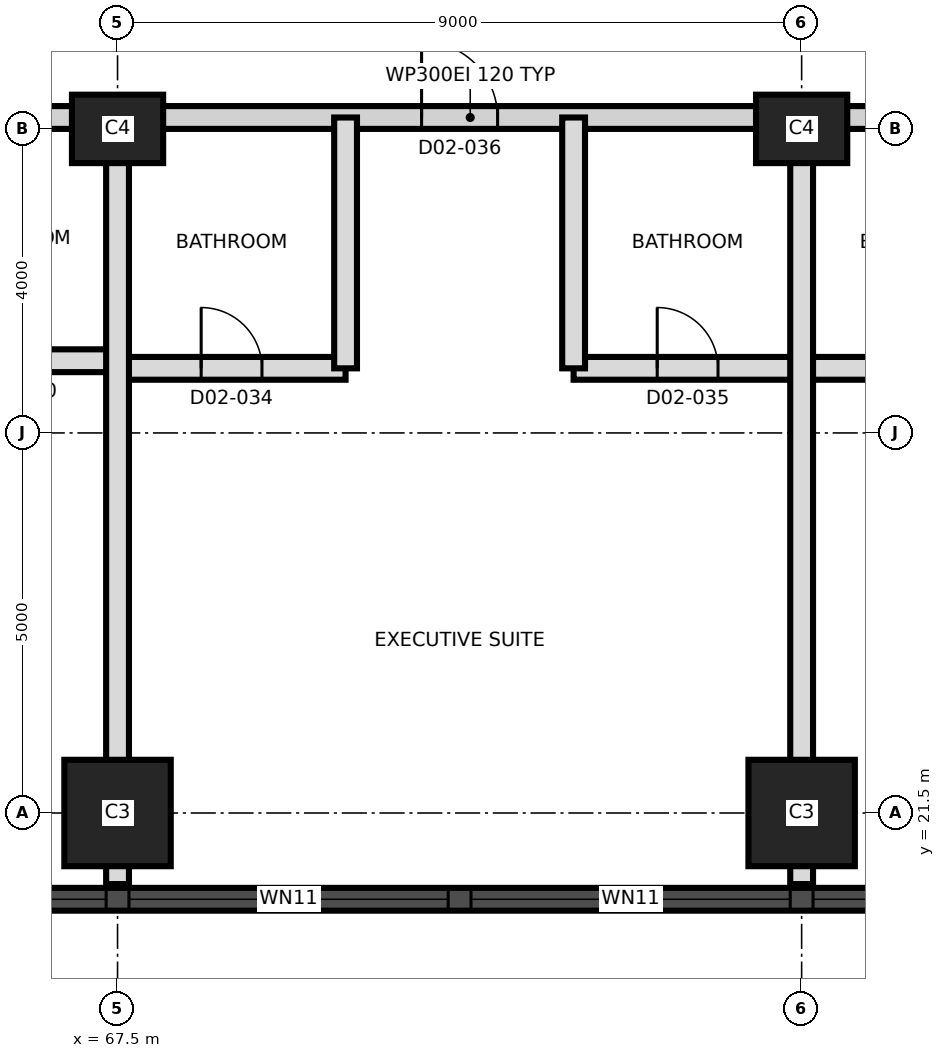
"""IFC4 building model, lengths in metres.
Left out: names, types, materials, properties, quantities, classifications, styles, units other than length and angle.
Written with IfcOpenShell. Run it as: python <this file> out.ifc"""

import sys

from ifc_helpers import new_model, si_unit, direction, frame, frame_2d, origin, origin_2d, place, context, subcontext, project, spatial, rectangle, extrude, element, fill, save


model = new_model("IFC4")
c1 = context("Model", 3, precision=1e-05, world=origin(), true_north=direction((0.0, 1.0)))
c2 = subcontext(c1, "Body", "Model", "MODEL_VIEW")
j1 = project(units=[si_unit("LENGTHUNIT", "METRE"), si_unit("PLANEANGLEUNIT", "RADIAN")], contexts=[c1])
p1 = place(None, origin())
s1 = spatial("IfcSite", under=j1, at=p1, CompositionType="ELEMENT")
p2 = place(p1, origin())
s2 = spatial("IfcBuilding", under=s1, at=p2, CompositionType="ELEMENT")
p3 = place(p2, frame((0.0, 0.0, 44.6)))
s3 = spatial("IfcBuildingStorey", under=s2, at=p3, CompositionType="ELEMENT", Elevation=44.6)
for number, where, z_axis, x_axis in (
    (1, (67.5, 21.5, 0.0), (0.0, 0.0, 1.0), (1.0, 0.0, 0.0)),
    (2, (76.5, 21.5, 0.0), (0.0, 0.0, 1.0), (1.0, 0.0, 0.0)),
):
    element("IfcColumn", number, at=place(p3, frame(where, z_axis=z_axis, x_axis=x_axis)), inside=s3, PredefinedType="COLUMN", context=c2, shape_type="SweptSolid", body=[
        extrude(rectangle(XDim=1.4, YDim=1.4, at=origin_2d()), origin(), (0.0, 0.0, 1.0), 3.7),
    ])
for number, where, z_axis, x_axis in (
    (3, (67.5, 30.5, 0.0), (0.0, 0.0, 1.0), (1.0, 0.0, 0.0)),
    (4, (76.5, 30.5, 0.0), (0.0, 0.0, 1.0), (1.0, 0.0, 0.0)),
):
    element("IfcColumn", number, at=place(p3, frame(where, z_axis=z_axis, x_axis=x_axis)), inside=s3, PredefinedType="COLUMN", context=c2, shape_type="SweptSolid", body=[
        extrude(rectangle(XDim=1.2, YDim=0.9, at=origin_2d()), origin(), (0.0, 0.0, 1.0), 3.7),
    ])
p4 = place(p3, frame((44.021, 20.365, 0.0), z_axis=(0.0, 0.0, 1.0), x_axis=(1.0, 0.0, 0.0)))
e5 = element("IfcWall", 5, at=p4, inside=s3, PredefinedType="SOLIDWALL", context=c2, shape_type="SweptSolid", body=[
    extrude(rectangle(XDim=43.466, YDim=0.3, at=frame_2d((21.733, 0.0))), origin(), (0.0, 0.0, 1.0), 3.4),
])
p5 = place(p4, frame((1.84, 0.0, 0.3)))
e6 = element("IfcOpeningElement", 6, at=p5, cuts=e5, PredefinedType="OPENING", context=c2, shape_type="SweptSolid", body=[
    extrude(rectangle(XDim=1.8, YDim=2.4, at=frame_2d((0.9, 1.2))), frame((0.0, 0.16, 0.0), z_axis=(0.0, -1.0, 0.0), x_axis=(1.0, 0.0, 0.0)), (0.0, 0.0, 1.0), 0.32),
])
p6 = place(p4, frame((5.63, 0.0, 0.9)))
e7 = element("IfcOpeningElement", 7, at=p6, cuts=e5, PredefinedType="OPENING", context=c2, shape_type="SweptSolid", body=[
    extrude(rectangle(XDim=4.2, YDim=1.5, at=frame_2d((2.1, 0.75))), frame((0.0, 0.16, 0.0), z_axis=(0.0, -1.0, 0.0), x_axis=(1.0, 0.0, 0.0)), (0.0, 0.0, 1.0), 0.32),
])
p7 = place(p4, frame((10.13, 0.0, 0.9)))
e8 = element("IfcOpeningElement", 8, at=p7, cuts=e5, PredefinedType="OPENING", context=c2, shape_type="SweptSolid", body=[
    extrude(rectangle(XDim=4.2, YDim=1.5, at=frame_2d((2.1, 0.75))), frame((0.0, 0.16, 0.0), z_axis=(0.0, -1.0, 0.0), x_axis=(1.0, 0.0, 0.0)), (0.0, 0.0, 1.0), 0.32),
])
p8 = place(p4, frame((14.63, 0.0, 0.9)))
e9 = element("IfcOpeningElement", 9, at=p8, cuts=e5, PredefinedType="OPENING", context=c2, shape_type="SweptSolid", body=[
    extrude(rectangle(XDim=4.2, YDim=1.5, at=frame_2d((2.1, 0.75))), frame((0.0, 0.16, 0.0), z_axis=(0.0, -1.0, 0.0), x_axis=(1.0, 0.0, 0.0)), (0.0, 0.0, 1.0), 0.32),
])
p9 = place(p4, frame((19.13, 0.0, 0.9)))
e10 = element("IfcOpeningElement", 10, at=p9, cuts=e5, PredefinedType="OPENING", context=c2, shape_type="SweptSolid", body=[
    extrude(rectangle(XDim=4.2, YDim=1.5, at=frame_2d((2.1, 0.75))), frame((0.0, 0.16, 0.0), z_axis=(0.0, -1.0, 0.0), x_axis=(1.0, 0.0, 0.0)), (0.0, 0.0, 1.0), 0.32),
])
p10 = place(p4, frame((23.63, 0.0, 0.9)))
e11 = element("IfcOpeningElement", 11, at=p10, cuts=e5, PredefinedType="OPENING", context=c2, shape_type="SweptSolid", body=[
    extrude(rectangle(XDim=4.2, YDim=1.5, at=frame_2d((2.1, 0.75))), frame((0.0, 0.16, 0.0), z_axis=(0.0, -1.0, 0.0), x_axis=(1.0, 0.0, 0.0)), (0.0, 0.0, 1.0), 0.32),
])
p11 = place(p4, frame((28.13, 0.0, 0.9)))
e12 = element("IfcOpeningElement", 12, at=p11, cuts=e5, PredefinedType="OPENING", context=c2, shape_type="SweptSolid", body=[
    extrude(rectangle(XDim=4.2, YDim=1.5, at=frame_2d((2.1, 0.75))), frame((0.0, 0.16, 0.0), z_axis=(0.0, -1.0, 0.0), x_axis=(1.0, 0.0, 0.0)), (0.0, 0.0, 1.0), 0.32),
])
p12 = place(p4, frame((32.63, 0.0, 0.9)))
e13 = element("IfcOpeningElement", 13, at=p12, cuts=e5, PredefinedType="OPENING", context=c2, shape_type="SweptSolid", body=[
    extrude(rectangle(XDim=4.2, YDim=1.5, at=frame_2d((2.1, 0.75))), frame((0.0, 0.16, 0.0), z_axis=(0.0, -1.0, 0.0), x_axis=(1.0, 0.0, 0.0)), (0.0, 0.0, 1.0), 0.32),
])
p13 = place(p4, frame((37.13, 0.0, 0.9)))
e14 = element("IfcOpeningElement", 14, at=p13, cuts=e5, PredefinedType="OPENING", context=c2, shape_type="SweptSolid", body=[
    extrude(rectangle(XDim=4.2, YDim=1.5, at=frame_2d((2.1, 0.75))), frame((0.0, 0.16, 0.0), z_axis=(0.0, -1.0, 0.0), x_axis=(1.0, 0.0, 0.0)), (0.0, 0.0, 1.0), 0.32),
])
p14 = place(p3, frame((67.5, 27.35, 0.0), z_axis=(0.0, 0.0, 1.0), x_axis=(1.0, 0.0, 0.0)))
e15 = element("IfcWall", 15, at=p14, inside=s3, PredefinedType="PARTITIONING", context=c2, shape_type="SweptSolid", body=[
    extrude(rectangle(XDim=3.0, YDim=0.3, at=frame_2d((1.5, 0.0))), origin(), (0.0, 0.0, 1.0), 3.4),
])
p15 = place(p14, frame((1.1, 0.0, 0.0)))
e16 = element("IfcOpeningElement", 16, at=p15, cuts=e15, PredefinedType="OPENING", context=c2, shape_type="SweptSolid", body=[
    extrude(rectangle(XDim=0.8, YDim=2.1, at=frame_2d((0.4, 1.05))), frame((0.0, 0.16, 0.0), z_axis=(0.0, -1.0, 0.0), x_axis=(1.0, 0.0, 0.0)), (0.0, 0.0, 1.0), 0.32),
])
p16 = place(p3, frame((73.5, 27.35, 0.0), z_axis=(0.0, 0.0, 1.0), x_axis=(1.0, 0.0, 0.0)))
e17 = element("IfcWall", 17, at=p16, inside=s3, PredefinedType="PARTITIONING", context=c2, shape_type="SweptSolid", body=[
    extrude(rectangle(XDim=6.0, YDim=0.3, at=frame_2d((3.0, 0.0))), origin(), (0.0, 0.0, 1.0), 3.4),
])
p17 = place(p16, frame((1.1, 0.0, 0.0)))
e18 = element("IfcOpeningElement", 18, at=p17, cuts=e17, PredefinedType="OPENING", context=c2, shape_type="SweptSolid", body=[
    extrude(rectangle(XDim=0.8, YDim=2.1, at=frame_2d((0.4, 1.05))), frame((0.0, 0.16, 0.0), z_axis=(0.0, -1.0, 0.0), x_axis=(1.0, 0.0, 0.0)), (0.0, 0.0, 1.0), 0.32),
])
p18 = place(p16, frame((4.1, 0.0, 0.0)))
e19 = element("IfcOpeningElement", 19, at=p18, cuts=e17, PredefinedType="OPENING", context=c2, shape_type="SweptSolid", body=[
    extrude(rectangle(XDim=0.8, YDim=2.1, at=frame_2d((0.4, 1.05))), frame((0.0, 0.16, 0.0), z_axis=(0.0, -1.0, 0.0), x_axis=(1.0, 0.0, 0.0)), (0.0, 0.0, 1.0), 0.32),
])
p19 = place(p3, frame((64.8, 27.45, 0.0), z_axis=(0.0, 0.0, 1.0), x_axis=(1.0, 0.0, 0.0)))
e20 = element("IfcWall", 20, at=p19, inside=s3, PredefinedType="PARTITIONING", context=c2, shape_type="SweptSolid", body=[
    extrude(rectangle(XDim=2.7, YDim=0.3, at=frame_2d((1.35, 0.0))), origin(), (0.0, 0.0, 1.0), 3.4),
])
p20 = place(p19, frame((0.95, 0.0, 0.0)))
e21 = element("IfcOpeningElement", 21, at=p20, cuts=e20, PredefinedType="OPENING", context=c2, shape_type="SweptSolid", body=[
    extrude(rectangle(XDim=0.8, YDim=2.1, at=frame_2d((0.4, 1.05))), frame((0.0, 0.16, 0.0), z_axis=(0.0, -1.0, 0.0), x_axis=(1.0, 0.0, 0.0)), (0.0, 0.0, 1.0), 0.32),
])
p21 = place(p3, frame((58.95, 30.65, 0.0), z_axis=(0.0, 0.0, 1.0), x_axis=(1.0, 0.0, 0.0)))
e22 = element("IfcWall", 22, at=p21, inside=s3, PredefinedType="PARTITIONING", context=c2, shape_type="SweptSolid", body=[
    extrude(rectangle(XDim=26.38, YDim=0.3, at=frame_2d((13.19, 0.0))), origin(), (0.0, 0.0, 1.0), 3.4),
])
p22 = place(p21, frame((0.685, 0.0, 0.0)))
e23 = element("IfcOpeningElement", 23, at=p22, cuts=e22, PredefinedType="OPENING", context=c2, shape_type="SweptSolid", body=[
    extrude(rectangle(XDim=1.2, YDim=2.1, at=frame_2d((0.6, 1.05))), frame((0.0, 0.16, 0.0), z_axis=(0.0, -1.0, 0.0), x_axis=(1.0, 0.0, 0.0)), (0.0, 0.0, 1.0), 0.32),
])
p23 = place(p21, frame((3.935, 0.0, 0.0)))
e24 = element("IfcOpeningElement", 24, at=p23, cuts=e22, PredefinedType="OPENING", context=c2, shape_type="SweptSolid", body=[
    extrude(rectangle(XDim=1.0, YDim=2.1, at=frame_2d((0.5, 1.05))), frame((0.0, 0.16, 0.0), z_axis=(0.0, -1.0, 0.0), x_axis=(1.0, 0.0, 0.0)), (0.0, 0.0, 1.0), 0.32),
])
p24 = place(p21, frame((12.55, 0.0, 0.0)))
e25 = element("IfcOpeningElement", 25, at=p24, cuts=e22, PredefinedType="OPENING", context=c2, shape_type="SweptSolid", body=[
    extrude(rectangle(XDim=1.0, YDim=2.4, at=frame_2d((0.5, 1.2))), frame((0.0, 0.16, 0.0), z_axis=(0.0, -1.0, 0.0), x_axis=(1.0, 0.0, 0.0)), (0.0, 0.0, 1.0), 0.32),
])
p25 = place(p21, frame((20.98, 0.0, 0.0)))
e26 = element("IfcOpeningElement", 26, at=p25, cuts=e22, PredefinedType="OPENING", context=c2, shape_type="SweptSolid", body=[
    extrude(rectangle(XDim=1.0, YDim=2.4, at=frame_2d((0.5, 1.2))), frame((0.0, 0.16, 0.0), z_axis=(0.0, -1.0, 0.0), x_axis=(1.0, 0.0, 0.0)), (0.0, 0.0, 1.0), 0.32),
])
p26 = place(p21, frame((22.63, 0.0, 0.0)))
e27 = element("IfcOpeningElement", 27, at=p26, cuts=e22, PredefinedType="OPENING", context=c2, shape_type="SweptSolid", body=[
    extrude(rectangle(XDim=1.0, YDim=2.4, at=frame_2d((0.5, 1.2))), frame((0.0, 0.16, 0.0), z_axis=(0.0, -1.0, 0.0), x_axis=(1.0, 0.0, 0.0)), (0.0, 0.0, 1.0), 0.32),
])
p27 = place(p3, frame((67.5, 20.565, 0.0), z_axis=(0.0, 0.0, 1.0), x_axis=(0.0, 1.0, 0.0)))
e28 = element("IfcWall", 28, at=p27, inside=s3, PredefinedType="PARTITIONING", context=c2, shape_type="SweptSolid", body=[
    extrude(rectangle(XDim=10.085, YDim=0.3, at=frame_2d((5.042, 0.0))), origin(), (0.0, 0.0, 1.0), 3.4),
])
for number, where, z_axis, x_axis in (
    (29, (70.5, 27.35, 0.0), (0.0, 0.0, 1.0), (0.0, 1.0, 0.0)),
    (30, (73.5, 27.35, 0.0), (0.0, 0.0, 1.0), (0.0, 1.0, 0.0)),
):
    element("IfcWall", number, at=place(p3, frame(where, z_axis=z_axis, x_axis=x_axis)), inside=s3, PredefinedType="PARTITIONING", context=c2, shape_type="SweptSolid", body=[
        extrude(rectangle(XDim=3.3, YDim=0.3, at=frame_2d((1.65, 0.0))), origin(), (0.0, 0.0, 1.0), 3.4),
    ])
p28 = place(p3, frame((76.5, 20.565, 0.0), z_axis=(0.0, 0.0, 1.0), x_axis=(0.0, 1.0, 0.0)))
e31 = element("IfcWall", 31, at=p28, inside=s3, PredefinedType="PARTITIONING", context=c2, shape_type="SweptSolid", body=[
    extrude(rectangle(XDim=10.085, YDim=0.3, at=frame_2d((5.042, 0.0))), origin(), (0.0, 0.0, 1.0), 3.4),
])
p29 = place(p9, origin())
e32 = element("IfcWindow", 32, at=p29, inside=s3, PartitioningType="SINGLE_PANEL", PredefinedType="WINDOW", context=c2, shape_type="SweptSolid", body=[
    extrude(rectangle(XDim=4.2, YDim=1.5, at=frame_2d((2.1, 0.75))), frame((0.0, 0.03, 0.0), z_axis=(0.0, -1.0, 0.0), x_axis=(1.0, 0.0, 0.0)), (0.0, 0.0, 1.0), 0.06),
])
fill(e10, e32)
p30 = place(p10, origin())
e33 = element("IfcWindow", 33, at=p30, inside=s3, PartitioningType="SINGLE_PANEL", PredefinedType="WINDOW", context=c2, shape_type="SweptSolid", body=[
    extrude(rectangle(XDim=4.2, YDim=1.5, at=frame_2d((2.1, 0.75))), frame((0.0, 0.03, 0.0), z_axis=(0.0, -1.0, 0.0), x_axis=(1.0, 0.0, 0.0)), (0.0, 0.0, 1.0), 0.06),
])
fill(e11, e33)
p31 = place(p11, origin())
e34 = element("IfcWindow", 34, at=p31, inside=s3, PartitioningType="SINGLE_PANEL", PredefinedType="WINDOW", context=c2, shape_type="SweptSolid", body=[
    extrude(rectangle(XDim=4.2, YDim=1.5, at=frame_2d((2.1, 0.75))), frame((0.0, 0.03, 0.0), z_axis=(0.0, -1.0, 0.0), x_axis=(1.0, 0.0, 0.0)), (0.0, 0.0, 1.0), 0.06),
])
fill(e12, e34)
p32 = place(p12, origin())
e35 = element("IfcWindow", 35, at=p32, inside=s3, PartitioningType="SINGLE_PANEL", PredefinedType="WINDOW", context=c2, shape_type="SweptSolid", body=[
    extrude(rectangle(XDim=4.2, YDim=1.5, at=frame_2d((2.1, 0.75))), frame((0.0, 0.03, 0.0), z_axis=(0.0, -1.0, 0.0), x_axis=(1.0, 0.0, 0.0)), (0.0, 0.0, 1.0), 0.06),
])
fill(e13, e35)
p33 = place(p15, origin())
e36 = element("IfcDoor", 36, at=p33, inside=s3, OperationType="SINGLE_SWING_LEFT", PredefinedType="DOOR", context=c2, shape_type="SweptSolid", body=[
    extrude(rectangle(XDim=0.8, YDim=2.1, at=frame_2d((0.4, 1.05))), frame((0.0, 0.025, 0.0), z_axis=(0.0, -1.0, 0.0), x_axis=(1.0, 0.0, 0.0)), (0.0, 0.0, 1.0), 0.05),
])
fill(e16, e36)
p34 = place(p17, origin())
e37 = element("IfcDoor", 37, at=p34, inside=s3, OperationType="SINGLE_SWING_LEFT", PredefinedType="DOOR", context=c2, shape_type="SweptSolid", body=[
    extrude(rectangle(XDim=0.8, YDim=2.1, at=frame_2d((0.4, 1.05))), frame((0.0, 0.025, 0.0), z_axis=(0.0, -1.0, 0.0), x_axis=(1.0, 0.0, 0.0)), (0.0, 0.0, 1.0), 0.05),
])
fill(e18, e37)
p35 = place(p24, origin())
e38 = element("IfcDoor", 38, at=p35, inside=s3, OperationType="SINGLE_SWING_RIGHT", PredefinedType="DOOR", context=c2, shape_type="SweptSolid", body=[
    extrude(rectangle(XDim=1.0, YDim=2.4, at=frame_2d((0.5, 1.2))), frame((0.0, 0.025, 0.0), z_axis=(0.0, -1.0, 0.0), x_axis=(1.0, 0.0, 0.0)), (0.0, 0.0, 1.0), 0.05),
])
fill(e25, e38)
save(model, sys.argv[1])
